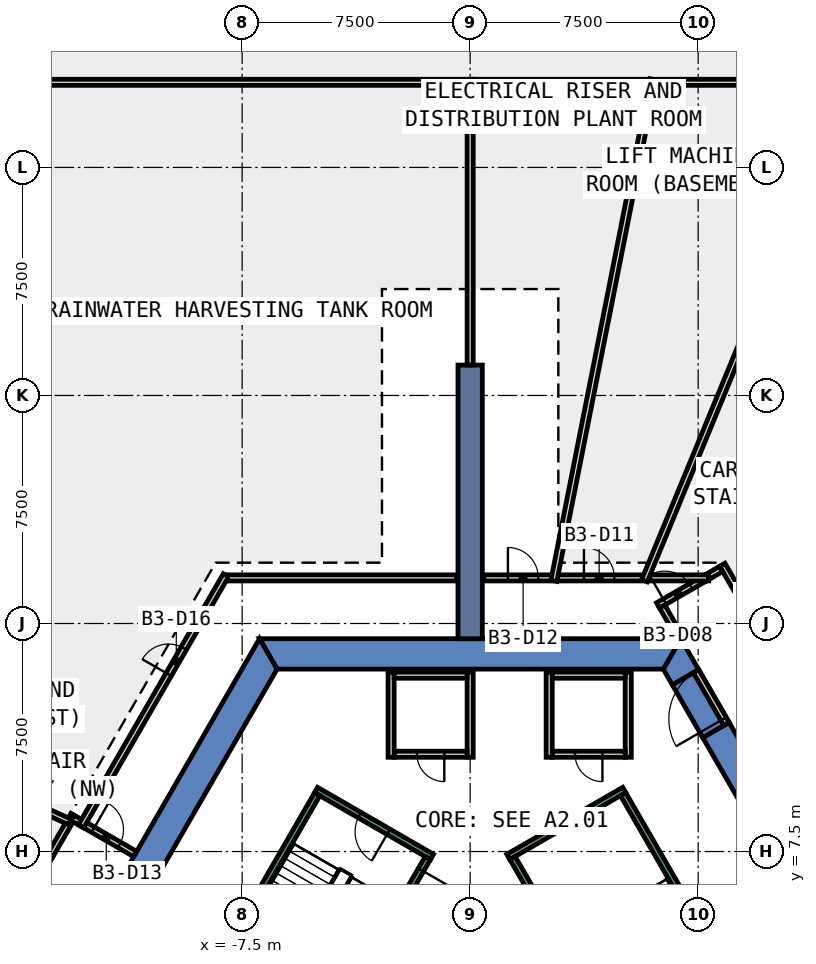
"""IFC4 building model, lengths in metres.
Left out: names, types, materials, properties, quantities, classifications, styles, units other than length and angle.
Written with IfcOpenShell. Run it as: python <this file> out.ifc"""

import sys

from ifc_helpers import new_model, si_unit, direction, frame, frame_2d, origin, place, context, subcontext, project, spatial, polyline, rectangle, outline, extrude, element, fill, save


model = new_model("IFC4")
c1 = context("Model", 3, precision=1e-05, world=origin(), true_north=direction((0.0, 1.0)))
c2 = subcontext(c1, "Body", "Model", "MODEL_VIEW")
j1 = project(units=[si_unit("LENGTHUNIT", "METRE"), si_unit("PLANEANGLEUNIT", "RADIAN")], contexts=[c1])
p1 = place(None, origin())
s1 = spatial("IfcSite", under=j1, at=p1, CompositionType="ELEMENT")
p2 = place(p1, origin())
s2 = spatial("IfcBuilding", under=s1, at=p2, CompositionType="ELEMENT")
p3 = place(p2, frame((0.0, 0.0, -16.5)))
s3 = spatial("IfcBuildingStorey", under=s2, at=p3, CompositionType="ELEMENT", Elevation=-16.5)
p4 = place(p3, origin())
e1 = element("IfcWall", 1, at=p4, inside=s3, PredefinedType="SHEAR", context=c2, shape_type="SweptSolid", body=[
    extrude(outline(polyline([(8.517, 11.748), (7.651, 11.248), (12.702, 2.5), (13.856, 2.5), (8.517, 11.748)])), origin(), (0.0, 0.0, 1.0), 5.08),
])
p5 = place(p3, origin())
e2 = element("IfcWall", 2, at=p5, inside=s3, PredefinedType="SHEAR", context=c2, shape_type="SweptSolid", body=[
    extrude(outline(polyline([(6.651, 12.98), (7.517, 13.48), (6.928, 14.5), (6.351, 13.5), (6.651, 12.98)])), origin(), (0.0, 0.0, 1.0), 5.08),
])
p6 = place(p3, frame((0.0, 0.0, 3.6)))
e3 = element("IfcWall", 3, at=p6, inside=s3, PredefinedType="SHEAR", context=c2, shape_type="SweptSolid", body=[
    extrude(outline(polyline([(7.517, 13.48), (6.651, 12.98), (7.651, 11.248), (8.517, 11.748), (7.517, 13.48)])), origin(), (0.0, 0.0, 1.0), 1.48),
])
p7 = place(p3, origin())
e4 = element("IfcWall", 4, at=p7, inside=s3, PredefinedType="SHEAR", context=c2, shape_type="SweptSolid", body=[
    extrude(outline(polyline([(6.928, 14.5), (-6.928, 14.5), (-6.351, 13.5), (6.351, 13.5), (6.928, 14.5)])), origin(), (0.0, 0.0, 1.0), 5.08),
])
p8 = place(p3, origin())
e5 = element("IfcWall", 5, at=p8, inside=s3, PredefinedType="SHEAR", context=c2, shape_type="SweptSolid", body=[
    extrude(outline(polyline([(-12.267, 5.252), (-11.402, 4.752), (-6.351, 13.5), (-6.928, 14.5), (-12.267, 5.252)])), origin(), (0.0, 0.0, 1.0), 5.08),
])
p9 = place(p3, frame((0.0, 14.5, 0.0), z_axis=(0.0, 0.0, 1.0), x_axis=(0.0, 1.0, 0.0)))
e6 = element("IfcWall", 6, at=p9, inside=s3, PredefinedType="SHEAR", context=c2, shape_type="SweptSolid", body=[
    extrude(rectangle(XDim=9.0, YDim=0.8, at=frame_2d((4.5, 0.0))), origin(), (0.0, 0.0, 1.0), 5.08),
])
p10 = place(p3, frame((6.18, 15.595, 0.0), z_axis=(0.0, 0.0, 1.0), x_axis=(0.866102512622, 0.499866419787, 0.0)))
e7 = element("IfcWall", 7, at=p10, inside=s3, PredefinedType="PARTITIONING", context=c2, shape_type="SweptSolid", body=[
    extrude(rectangle(XDim=1.811, YDim=0.2, at=frame_2d((0.905, 0.0))), origin(), (0.0, 0.0, 1.0), 5.08),
])
p11 = place(p10, frame((0.254, 0.0, 0.0)))
e8 = element("IfcOpeningElement", 8, at=p11, cuts=e7, PredefinedType="OPENING", context=c2, shape_type="SweptSolid", body=[
    extrude(rectangle(XDim=1.0, YDim=2.1, at=frame_2d((0.5, 1.05))), frame((0.0, 0.11, 0.0), z_axis=(0.0, -1.0, 0.0), x_axis=(1.0, 0.0, 0.0)), (0.0, 0.0, 1.0), 0.22),
])
p12 = place(p3, frame((6.317, 15.558, 0.0), z_axis=(0.0, 0.0, 1.0), x_axis=(0.500114474492, -0.865959301817, 0.0)))
e9 = element("IfcWall", 9, at=p12, inside=s3, PredefinedType="PARTITIONING", context=c2, shape_type="SweptSolid", body=[
    extrude(rectangle(XDim=1.222, YDim=0.2, at=frame_2d((0.611, 0.0))), origin(), (0.0, 0.0, 1.0), 5.08),
])
p13 = place(p3, frame((8.295, 16.932, 0.0), z_axis=(0.0, 0.0, 1.0), x_axis=(0.499982693035, -0.866035395735, 0.0)))
e10 = element("IfcWall", 10, at=p13, inside=s3, PredefinedType="PARTITIONING", context=c2, shape_type="SweptSolid", body=[
    extrude(rectangle(XDim=7.2, YDim=0.2, at=frame_2d((3.6, 0.0))), origin(), (0.0, 0.0, 1.0), 5.08),
])
p14 = place(p13, frame((2.659, 0.0, 0.0)))
e11 = element("IfcOpeningElement", 11, at=p14, cuts=e10, PredefinedType="OPENING", context=c2, shape_type="SweptSolid", body=[
    extrude(rectangle(XDim=1.0, YDim=2.1, at=frame_2d((0.5, 1.05))), frame((0.0, 0.11, 0.0), z_axis=(0.0, -1.0, 0.0), x_axis=(1.0, 0.0, 0.0)), (0.0, 0.0, 1.0), 0.22),
])
p15 = place(p3, frame((7.748, 16.5, 0.0), z_axis=(0.0, 0.0, 1.0), x_axis=(0.865681519127, 0.500595153234, 0.0)))
e12 = element("IfcWall", 12, at=p15, inside=s3, PredefinedType="PARTITIONING", context=c2, shape_type="SweptSolid", body=[
    extrude(rectangle(XDim=0.589, YDim=0.2, at=frame_2d((0.294, 0.0))), origin(), (0.0, 0.0, 1.0), 5.08),
])
p16 = place(p3, frame((5.871, 16.5, 0.0), z_axis=(0.0, 0.0, 1.0), x_axis=(1.0, 0.0, 0.0)))
e13 = element("IfcWall", 13, at=p16, inside=s3, PredefinedType="PARTITIONING", context=c2, shape_type="SweptSolid", body=[
    extrude(rectangle(XDim=1.977, YDim=0.2, at=frame_2d((0.988, 0.0))), origin(), (0.0, 0.0, 1.0), 5.08),
])
p17 = place(p3, frame((2.872, 16.5, 0.0), z_axis=(0.0, 0.0, 1.0), x_axis=(1.0, 0.0, 0.0)))
e14 = element("IfcWall", 14, at=p17, inside=s3, PredefinedType="PARTITIONING", context=c2, shape_type="SweptSolid", body=[
    extrude(rectangle(XDim=2.799, YDim=0.2, at=frame_2d((1.399, 0.0))), origin(), (0.0, 0.0, 1.0), 5.08),
])
p18 = place(p17, frame((0.871, 0.0, 0.0)))
e15 = element("IfcOpeningElement", 15, at=p18, cuts=e14, PredefinedType="OPENING", context=c2, shape_type="SweptSolid", body=[
    extrude(rectangle(XDim=1.0, YDim=2.1, at=frame_2d((0.5, 1.05))), frame((0.0, 0.11, 0.0), z_axis=(0.0, -1.0, 0.0), x_axis=(1.0, 0.0, 0.0)), (0.0, 0.0, 1.0), 0.22),
])
p19 = place(p3, frame((0.45, 16.5, 0.0), z_axis=(0.0, 0.0, 1.0), x_axis=(1.0, 0.0, 0.0)))
e16 = element("IfcWall", 16, at=p19, inside=s3, PredefinedType="PARTITIONING", context=c2, shape_type="SweptSolid", body=[
    extrude(rectangle(XDim=2.222, YDim=0.2, at=frame_2d((1.111, 0.0))), origin(), (0.0, 0.0, 1.0), 5.08),
])
p20 = place(p19, frame((0.792, 0.0, 0.0)))
e17 = element("IfcOpeningElement", 17, at=p20, cuts=e16, PredefinedType="OPENING", context=c2, shape_type="SweptSolid", body=[
    extrude(rectangle(XDim=1.0, YDim=2.1, at=frame_2d((0.5, 1.05))), frame((0.0, 0.11, 0.0), z_axis=(0.0, -1.0, 0.0), x_axis=(1.0, 0.0, 0.0)), (0.0, 0.0, 1.0), 0.22),
])
p21 = place(p3, frame((5.733, 16.408, 0.0), z_axis=(0.0, 0.0, 1.0), x_axis=(0.381113406353, 0.924528296754, 0.0)))
e18 = element("IfcWall", 18, at=p21, inside=s3, PredefinedType="PARTITIONING", context=c2, shape_type="SweptSolid", body=[
    extrude(rectangle(XDim=17.83, YDim=0.2, at=frame_2d((8.915, 0.0))), origin(), (0.0, 0.0, 1.0), 5.08),
])
p22 = place(p3, frame((2.753, 16.402, 0.0), z_axis=(0.0, 0.0, 1.0), x_axis=(0.194225601905, 0.98095688772, 0.0)))
e19 = element("IfcWall", 19, at=p22, inside=s3, PredefinedType="PARTITIONING", context=c2, shape_type="SweptSolid", body=[
    extrude(rectangle(XDim=16.816, YDim=0.2, at=frame_2d((8.408, 0.0))), origin(), (0.0, 0.0, 1.0), 5.08),
])
p23 = place(p3, frame((6.1, 32.8, 0.0), z_axis=(0.0, 0.0, 1.0), x_axis=(1.0, 0.0, 0.0)))
e20 = element("IfcWall", 20, at=p23, inside=s3, PredefinedType="PARTITIONING", context=c2, shape_type="SweptSolid", body=[
    extrude(rectangle(XDim=6.29, YDim=0.2, at=frame_2d((3.145, 0.0))), origin(), (0.0, 0.0, 1.0), 5.08),
])
p24 = place(p3, frame((0.0, 23.5, 0.0), z_axis=(0.0, 0.0, 1.0), x_axis=(0.0, 1.0, 0.0)))
e21 = element("IfcWall", 21, at=p24, inside=s3, PredefinedType="PARTITIONING", context=c2, shape_type="SweptSolid", body=[
    extrude(rectangle(XDim=9.3, YDim=0.2, at=frame_2d((4.65, 0.0))), origin(), (0.0, 0.0, 1.0), 5.08),
])
p25 = place(p3, frame((0.1, 32.8, 0.0), z_axis=(0.0, 0.0, 1.0), x_axis=(1.0, 0.0, 0.0)))
e22 = element("IfcWall", 22, at=p25, inside=s3, PredefinedType="PARTITIONING", context=c2, shape_type="SweptSolid", body=[
    extrude(rectangle(XDim=5.8, YDim=0.2, at=frame_2d((2.9, 0.0))), origin(), (0.0, 0.0, 1.0), 5.08),
])
p26 = place(p3, frame((-12.749, 8.417, 0.0), z_axis=(0.0, 0.0, 1.0), x_axis=(0.866010750942, -0.50002537861, 0.0)))
e23 = element("IfcWall", 23, at=p26, inside=s3, PredefinedType="PARTITIONING", context=c2, shape_type="SweptSolid", body=[
    extrude(rectangle(XDim=2.0, YDim=0.2, at=frame_2d((1.0, 0.0))), origin(), (0.0, 0.0, 1.0), 5.08),
])
p27 = place(p26, frame((0.4, 0.0, 0.0)))
e24 = element("IfcOpeningElement", 24, at=p27, cuts=e23, PredefinedType="OPENING", context=c2, shape_type="SweptSolid", body=[
    extrude(rectangle(XDim=1.0, YDim=2.1, at=frame_2d((0.5, 1.05))), frame((0.0, 0.11, 0.0), z_axis=(0.0, -1.0, 0.0), x_axis=(1.0, 0.0, 0.0)), (0.0, 0.0, 1.0), 0.22),
])
p28 = place(p3, frame((-15.0, 5.318, 0.0), z_axis=(0.0, 0.0, 1.0), x_axis=(0.500034145141, 0.866005689181, 0.0)))
e25 = element("IfcWall", 25, at=p28, inside=s3, PredefinedType="PARTITIONING", context=c2, shape_type="SweptSolid", body=[
    extrude(rectangle(XDim=3.91, YDim=0.2, at=frame_2d((1.955, 0.0))), origin(), (0.0, 0.0, 1.0), 5.08),
])
p29 = place(p28, frame((0.418, 0.0, 0.0)))
e26 = element("IfcOpeningElement", 26, at=p29, cuts=e25, PredefinedType="OPENING", context=c2, shape_type="SweptSolid", body=[
    extrude(rectangle(XDim=1.0, YDim=2.1, at=frame_2d((0.5, 1.05))), frame((0.0, 0.11, 0.0), z_axis=(0.0, -1.0, 0.0), x_axis=(1.0, 0.0, 0.0)), (0.0, 0.0, 1.0), 0.22),
])
p30 = place(p3, frame((-13.082, 8.609, 0.0), z_axis=(0.0, 0.0, 1.0), x_axis=(0.865998573537, -0.500046468473, 0.0)))
e27 = element("IfcWall", 27, at=p30, inside=s3, PredefinedType="PARTITIONING", context=c2, shape_type="SweptSolid", body=[
    extrude(rectangle(XDim=0.37, YDim=0.2, at=frame_2d((0.185, 0.0))), origin(), (0.0, 0.0, 1.0), 5.08),
])
p31 = place(p3, frame((-12.799, 8.33, 0.0), z_axis=(0.0, 0.0, 1.0), x_axis=(0.499923440311, 0.86606960103, 0.0)))
e28 = element("IfcWall", 28, at=p31, inside=s3, PredefinedType="PARTITIONING", context=c2, shape_type="SweptSolid", body=[
    extrude(rectangle(XDim=9.534, YDim=0.2, at=frame_2d((4.767, 0.0))), origin(), (0.0, 0.0, 1.0), 5.08),
])
p32 = place(p31, frame((5.766, 0.0, 0.0)))
e29 = element("IfcOpeningElement", 29, at=p32, cuts=e28, PredefinedType="OPENING", context=c2, shape_type="SweptSolid", body=[
    extrude(rectangle(XDim=1.0, YDim=2.1, at=frame_2d((0.5, 1.05))), frame((0.0, 0.11, 0.0), z_axis=(0.0, -1.0, 0.0), x_axis=(1.0, 0.0, 0.0)), (0.0, 0.0, 1.0), 0.22),
])
p33 = place(p3, frame((-7.983, 16.5, 0.0), z_axis=(0.0, 0.0, 1.0), x_axis=(1.0, 0.0, 0.0)))
e30 = element("IfcWall", 30, at=p33, inside=s3, PredefinedType="PARTITIONING", context=c2, shape_type="SweptSolid", body=[
    extrude(rectangle(XDim=7.533, YDim=0.2, at=frame_2d((3.767, 0.0))), origin(), (0.0, 0.0, 1.0), 5.08),
])
p34 = place(p3, frame((-14.909, 9.264, 0.0), z_axis=(0.0, 0.0, 1.0), x_axis=(0.910722060418, -0.41301976789, 0.0)))
e31 = element("IfcWall", 31, at=p34, inside=s3, PredefinedType="PARTITIONING", context=c2, shape_type="SweptSolid", body=[
    extrude(rectangle(XDim=1.903, YDim=0.2, at=frame_2d((0.951, 0.0))), origin(), (0.0, 0.0, 1.0), 5.08),
])
p35 = place(p3, frame((-14.9, 32.8, 0.0), z_axis=(0.0, 0.0, 1.0), x_axis=(1.0, 0.0, 0.0)))
e32 = element("IfcWall", 32, at=p35, inside=s3, PredefinedType="PARTITIONING", context=c2, shape_type="SweptSolid", body=[
    extrude(rectangle(XDim=15.0, YDim=0.2, at=frame_2d((7.5, 0.0))), origin(), (0.0, 0.0, 1.0), 5.08),
])
p36 = place(p3, frame((5.2, 13.4, 0.0), z_axis=(0.0, 0.0, 1.0), x_axis=(0.0, -1.0, 0.0)))
e33 = element("IfcWall", 33, at=p36, inside=s3, PredefinedType="PARTITIONING", context=c2, shape_type="SweptSolid", body=[
    extrude(rectangle(XDim=2.8, YDim=0.2, at=frame_2d((1.4, 0.0))), origin(), (0.0, 0.0, 1.0), 5.08),
])
p37 = place(p3, frame((5.1, 10.7, 0.0), z_axis=(0.0, 0.0, 1.0), x_axis=(-1.0, 0.0, 0.0)))
e34 = element("IfcWall", 34, at=p37, inside=s3, PredefinedType="PARTITIONING", context=c2, shape_type="SweptSolid", body=[
    extrude(rectangle(XDim=2.4, YDim=0.2, at=frame_2d((1.2, 0.0))), origin(), (0.0, 0.0, 1.0), 5.08),
])
p38 = place(p37, frame((0.75, 0.0, 0.0)))
e35 = element("IfcOpeningElement", 35, at=p38, cuts=e34, PredefinedType="OPENING", context=c2, shape_type="SweptSolid", body=[
    extrude(rectangle(XDim=0.9, YDim=2.1, at=frame_2d((0.45, 1.05))), frame((0.0, 0.11, 0.0), z_axis=(0.0, -1.0, 0.0), x_axis=(1.0, 0.0, 0.0)), (0.0, 0.0, 1.0), 0.22),
])
p39 = place(p3, frame((2.6, 10.6, 0.0), z_axis=(0.0, 0.0, 1.0), x_axis=(0.0, 1.0, 0.0)))
e36 = element("IfcWall", 36, at=p39, inside=s3, PredefinedType="PARTITIONING", context=c2, shape_type="SweptSolid", body=[
    extrude(rectangle(XDim=2.8, YDim=0.2, at=frame_2d((1.4, 0.0))), origin(), (0.0, 0.0, 1.0), 5.08),
])
p40 = place(p3, frame((2.7, 13.3, 0.0), z_axis=(0.0, 0.0, 1.0), x_axis=(1.0, 0.0, 0.0)))
e37 = element("IfcWall", 37, at=p40, inside=s3, PredefinedType="PARTITIONING", context=c2, shape_type="SweptSolid", body=[
    extrude(rectangle(XDim=2.4, YDim=0.2, at=frame_2d((1.2, 0.0))), origin(), (0.0, 0.0, 1.0), 5.08),
])
p41 = place(p3, frame((0.0, 13.4, 0.0), z_axis=(0.0, 0.0, 1.0), x_axis=(0.0, -1.0, 0.0)))
e38 = element("IfcWall", 38, at=p41, inside=s3, PredefinedType="PARTITIONING", context=c2, shape_type="SweptSolid", body=[
    extrude(rectangle(XDim=2.8, YDim=0.2, at=frame_2d((1.4, 0.0))), origin(), (0.0, 0.0, 1.0), 5.08),
])
p42 = place(p3, frame((-0.1, 10.7, 0.0), z_axis=(0.0, 0.0, 1.0), x_axis=(-1.0, 0.0, 0.0)))
e39 = element("IfcWall", 39, at=p42, inside=s3, PredefinedType="PARTITIONING", context=c2, shape_type="SweptSolid", body=[
    extrude(rectangle(XDim=2.4, YDim=0.2, at=frame_2d((1.2, 0.0))), origin(), (0.0, 0.0, 1.0), 5.08),
])
p43 = place(p42, frame((0.75, 0.0, 0.0)))
e40 = element("IfcOpeningElement", 40, at=p43, cuts=e39, PredefinedType="OPENING", context=c2, shape_type="SweptSolid", body=[
    extrude(rectangle(XDim=0.9, YDim=2.1, at=frame_2d((0.45, 1.05))), frame((0.0, 0.11, 0.0), z_axis=(0.0, -1.0, 0.0), x_axis=(1.0, 0.0, 0.0)), (0.0, 0.0, 1.0), 0.22),
])
p44 = place(p3, frame((-2.6, 10.6, 0.0), z_axis=(0.0, 0.0, 1.0), x_axis=(0.0, 1.0, 0.0)))
e41 = element("IfcWall", 41, at=p44, inside=s3, PredefinedType="PARTITIONING", context=c2, shape_type="SweptSolid", body=[
    extrude(rectangle(XDim=2.8, YDim=0.2, at=frame_2d((1.4, 0.0))), origin(), (0.0, 0.0, 1.0), 5.08),
])
p45 = place(p3, frame((-2.5, 13.3, 0.0), z_axis=(0.0, 0.0, 1.0), x_axis=(1.0, 0.0, 0.0)))
e42 = element("IfcWall", 42, at=p45, inside=s3, PredefinedType="PARTITIONING", context=c2, shape_type="SweptSolid", body=[
    extrude(rectangle(XDim=2.4, YDim=0.2, at=frame_2d((1.2, 0.0))), origin(), (0.0, 0.0, 1.0), 5.08),
])
p46 = place(p3, frame((8.43, 11.698, 0.0), z_axis=(0.0, 0.0, 1.0), x_axis=(-0.50002537861, 0.866010750942, 0.0)))
e43 = element("IfcWall", 43, at=p46, inside=s3, PredefinedType="PARTITIONING", context=c2, shape_type="SweptSolid", body=[
    extrude(rectangle(XDim=2.0, YDim=0.2, at=frame_2d((1.0, 0.0))), origin(), (0.0, 0.0, 1.0), 2.4),
])
p47 = place(p46, frame((0.19, 0.0, 0.0)))
e44 = element("IfcOpeningElement", 44, at=p47, cuts=e43, PredefinedType="OPENING", context=c2, shape_type="SweptSolid", body=[
    extrude(rectangle(XDim=1.8, YDim=2.1, at=frame_2d((0.9, 1.05))), frame((0.0, 0.11, 0.0), z_axis=(0.0, -1.0, 0.0), x_axis=(1.0, 0.0, 0.0)), (0.0, 0.0, 1.0), 0.22),
])
p48 = place(p3, frame((1.256, 7.324, 0.0), z_axis=(0.0, 0.0, 1.0), x_axis=(0.866046073146, 0.499964197906, 0.0)))
e45 = element("IfcWall", 45, at=p48, inside=s3, PredefinedType="STANDARD", context=c2, shape_type="SweptSolid", body=[
    extrude(rectangle(XDim=4.4, YDim=0.2, at=frame_2d((2.2, 0.0))), origin(), (0.0, 0.0, 1.0), 5.08),
])
p49 = place(p3, frame((4.843, 1.312, 0.0), z_axis=(0.0, 0.0, 1.0), x_axis=(-0.499963383562, 0.866046543262, 0.0)))
e46 = element("IfcWall", 46, at=p49, inside=s3, PredefinedType="STANDARD", context=c2, shape_type="SweptSolid", body=[
    extrude(rectangle(XDim=6.9, YDim=0.2, at=frame_2d((3.45, 0.0))), origin(), (0.0, 0.0, 1.0), 5.08),
])
p50 = place(p49, frame((0.45, 0.0, 0.0)))
e47 = element("IfcOpeningElement", 47, at=p50, cuts=e46, PredefinedType="OPENING", context=c2, shape_type="SweptSolid", body=[
    extrude(rectangle(XDim=1.1, YDim=2.2, at=frame_2d((0.55, 1.1))), frame((0.0, 0.11, 0.0), z_axis=(0.0, -1.0, 0.0), x_axis=(1.0, 0.0, 0.0)), (0.0, 0.0, 1.0), 0.22),
])
p51 = place(p3, frame((8.48, 3.412, 0.0), z_axis=(0.0, 0.0, 1.0), x_axis=(-0.499978703459, 0.866037698999, 0.0)))
e48 = element("IfcWall", 48, at=p51, inside=s3, PredefinedType="STANDARD", context=c2, shape_type="SweptSolid", body=[
    extrude(rectangle(XDim=6.9, YDim=0.2, at=frame_2d((3.45, 0.0))), origin(), (0.0, 0.0, 1.0), 5.08),
])
p52 = place(p3, frame((-1.256, 7.324, 0.0), z_axis=(0.0, 0.0, 1.0), x_axis=(-0.866046073146, 0.499964197906, 0.0)))
e49 = element("IfcWall", 49, at=p52, inside=s3, PredefinedType="STANDARD", context=c2, shape_type="SweptSolid", body=[
    extrude(rectangle(XDim=4.4, YDim=0.2, at=frame_2d((2.2, 0.0))), origin(), (0.0, 0.0, 1.0), 5.08),
])
p53 = place(p52, frame((1.65, 0.0, 0.0)))
e50 = element("IfcOpeningElement", 50, at=p53, cuts=e49, PredefinedType="OPENING", context=c2, shape_type="SweptSolid", body=[
    extrude(rectangle(XDim=1.1, YDim=2.2, at=frame_2d((0.55, 1.1))), frame((0.0, 0.11, 0.0), z_axis=(0.0, -1.0, 0.0), x_axis=(1.0, 0.0, 0.0)), (0.0, 0.0, 1.0), 0.22),
])
p54 = place(p3, frame((-1.393, 7.288, 0.0), z_axis=(0.0, 0.0, 1.0), x_axis=(-0.499963383562, -0.866046543262, 0.0)))
e51 = element("IfcWall", 51, at=p54, inside=s3, PredefinedType="STANDARD", context=c2, shape_type="SweptSolid", body=[
    extrude(rectangle(XDim=6.9, YDim=0.2, at=frame_2d((3.45, 0.0))), origin(), (0.0, 0.0, 1.0), 5.08),
])
p55 = place(p54, frame((0.45, 0.0, 0.0)))
e52 = element("IfcOpeningElement", 52, at=p55, cuts=e51, PredefinedType="OPENING", context=c2, shape_type="SweptSolid", body=[
    extrude(rectangle(XDim=1.1, YDim=2.2, at=frame_2d((0.55, 1.1))), frame((0.0, 0.11, 0.0), z_axis=(0.0, -1.0, 0.0), x_axis=(1.0, 0.0, 0.0)), (0.0, 0.0, 1.0), 0.22),
])
p56 = place(p3, frame((-5.03, 9.388, 0.0), z_axis=(0.0, 0.0, 1.0), x_axis=(-0.499978703459, -0.866037698999, 0.0)))
e53 = element("IfcWall", 53, at=p56, inside=s3, PredefinedType="STANDARD", context=c2, shape_type="SweptSolid", body=[
    extrude(rectangle(XDim=6.9, YDim=0.2, at=frame_2d((3.45, 0.0))), origin(), (0.0, 0.0, 1.0), 5.08),
])
p57 = place(p11, origin())
e54 = element("IfcDoor", 54, at=p57, inside=s3, OperationType="SINGLE_SWING_RIGHT", PredefinedType="DOOR", context=c2, shape_type="SweptSolid", body=[
    extrude(rectangle(XDim=1.0, YDim=2.1, at=frame_2d((0.5, 1.05))), frame((0.0, 0.025, 0.0), z_axis=(0.0, -1.0, 0.0), x_axis=(1.0, 0.0, 0.0)), (0.0, 0.0, 1.0), 0.05),
])
fill(e8, e54)
p58 = place(p18, origin())
e55 = element("IfcDoor", 55, at=p58, inside=s3, OperationType="SINGLE_SWING_LEFT", PredefinedType="DOOR", context=c2, shape_type="SweptSolid", body=[
    extrude(rectangle(XDim=1.0, YDim=2.1, at=frame_2d((0.5, 1.05))), frame((0.0, 0.025, 0.0), z_axis=(0.0, -1.0, 0.0), x_axis=(1.0, 0.0, 0.0)), (0.0, 0.0, 1.0), 0.05),
])
fill(e15, e55)
p59 = place(p20, origin())
e56 = element("IfcDoor", 56, at=p59, inside=s3, OperationType="SINGLE_SWING_RIGHT", PredefinedType="DOOR", context=c2, shape_type="SweptSolid", body=[
    extrude(rectangle(XDim=1.0, YDim=2.1, at=frame_2d((0.5, 1.05))), frame((0.0, 0.025, 0.0), z_axis=(0.0, -1.0, 0.0), x_axis=(1.0, 0.0, 0.0)), (0.0, 0.0, 1.0), 0.05),
])
fill(e17, e56)
p60 = place(p27, origin())
e57 = element("IfcDoor", 57, at=p60, inside=s3, OperationType="SINGLE_SWING_LEFT", PredefinedType="DOOR", context=c2, shape_type="SweptSolid", body=[
    extrude(rectangle(XDim=1.0, YDim=2.1, at=frame_2d((0.5, 1.05))), frame((0.0, 0.025, 0.0), z_axis=(0.0, -1.0, 0.0), x_axis=(1.0, 0.0, 0.0)), (0.0, 0.0, 1.0), 0.05),
])
fill(e24, e57)
p61 = place(p32, origin())
e58 = element("IfcDoor", 58, at=p61, inside=s3, OperationType="SINGLE_SWING_RIGHT", PredefinedType="DOOR", context=c2, shape_type="SweptSolid", body=[
    extrude(rectangle(XDim=1.0, YDim=2.1, at=frame_2d((0.5, 1.05))), frame((0.0, 0.025, 0.0), z_axis=(0.0, -1.0, 0.0), x_axis=(1.0, 0.0, 0.0)), (0.0, 0.0, 1.0), 0.05),
])
fill(e29, e58)
p62 = place(p38, origin())
e59 = element("IfcDoor", 59, at=p62, inside=s3, OperationType="SINGLE_SWING_RIGHT", PredefinedType="DOOR", context=c2, shape_type="SweptSolid", body=[
    extrude(rectangle(XDim=0.9, YDim=2.1, at=frame_2d((0.45, 1.05))), frame((0.0, 0.025, 0.0), z_axis=(0.0, -1.0, 0.0), x_axis=(1.0, 0.0, 0.0)), (0.0, 0.0, 1.0), 0.05),
])
fill(e35, e59)
p63 = place(p43, origin())
e60 = element("IfcDoor", 60, at=p63, inside=s3, OperationType="SINGLE_SWING_RIGHT", PredefinedType="DOOR", context=c2, shape_type="SweptSolid", body=[
    extrude(rectangle(XDim=0.9, YDim=2.1, at=frame_2d((0.45, 1.05))), frame((0.0, 0.025, 0.0), z_axis=(0.0, -1.0, 0.0), x_axis=(1.0, 0.0, 0.0)), (0.0, 0.0, 1.0), 0.05),
])
fill(e40, e60)
p64 = place(p47, origin())
e61 = element("IfcDoor", 61, at=p64, inside=s3, OperationType="DOUBLE_DOOR_SINGLE_SWING", PredefinedType="DOOR", context=c2, shape_type="SweptSolid", body=[
    extrude(rectangle(XDim=1.8, YDim=2.1, at=frame_2d((0.9, 1.05))), frame((0.0, 0.025, 0.0), z_axis=(0.0, -1.0, 0.0), x_axis=(1.0, 0.0, 0.0)), (0.0, 0.0, 1.0), 0.05),
])
fill(e44, e61)
p65 = place(p55, origin())
e62 = element("IfcDoor", 62, at=p65, inside=s3, OperationType="SINGLE_SWING_LEFT", PredefinedType="DOOR", context=c2, shape_type="SweptSolid", body=[
    extrude(rectangle(XDim=1.1, YDim=2.2, at=frame_2d((0.55, 1.1))), frame((0.0, 0.025, 0.0), z_axis=(0.0, -1.0, 0.0), x_axis=(1.0, 0.0, 0.0)), (0.0, 0.0, 1.0), 0.05),
])
fill(e52, e62)
p66 = place(p53, origin())
e63 = element("IfcDoor", 63, at=p66, inside=s3, OperationType="SINGLE_SWING_LEFT", PredefinedType="DOOR", context=c2, shape_type="SweptSolid", body=[
    extrude(rectangle(XDim=1.1, YDim=2.2, at=frame_2d((0.55, 1.1))), frame((0.0, 0.025, 0.0), z_axis=(0.0, -1.0, 0.0), x_axis=(1.0, 0.0, 0.0)), (0.0, 0.0, 1.0), 0.05),
])
fill(e50, e63)
save(model, sys.argv[1])
